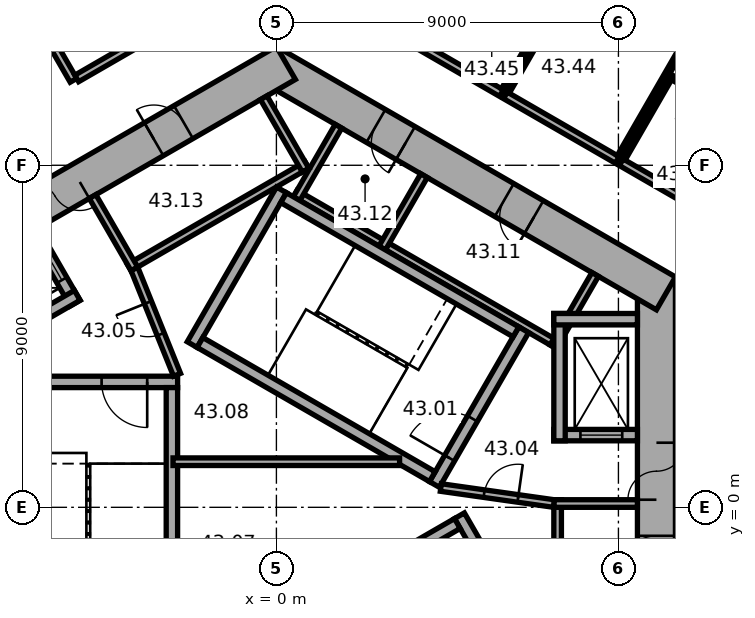
"""IFC4 building model, lengths in metres.
Left out: names, types, materials, properties, quantities, classifications, styles, units other than length and angle.
Written with IfcOpenShell. Run it as: python <this file> out.ifc"""

import sys

from ifc_helpers import new_model, si_unit, direction, frame, frame_2d, origin, place, context, subcontext, project, spatial, rectangle, extrude, element, fill, save


model = new_model("IFC4")
c1 = context("Model", 3, precision=1e-05, world=origin(), true_north=direction((0.0, 1.0)))
c2 = subcontext(c1, "Body", "Model", "MODEL_VIEW")
j1 = project(units=[si_unit("LENGTHUNIT", "METRE"), si_unit("PLANEANGLEUNIT", "RADIAN")], contexts=[c1])
p1 = place(None, origin())
s1 = spatial("IfcSite", under=j1, at=p1, CompositionType="ELEMENT")
p2 = place(p1, origin())
s2 = spatial("IfcBuilding", under=s1, at=p2, CompositionType="ELEMENT")
p3 = place(p2, frame((0.0, 0.0, 176.2)))
s3 = spatial("IfcBuildingStorey", under=s2, at=p3, CompositionType="ELEMENT", Elevation=176.2)
p4 = place(p3, frame((10.0, -6.062, 0.0), z_axis=(0.0, 0.0, 1.0), x_axis=(0.0, 1.0, 0.0)))
e1 = element("IfcWall", 1, at=p4, inside=s3, PredefinedType="SHEAR", context=c2, shape_type="SweptSolid", body=[
    extrude(rectangle(XDim=12.125, YDim=1.0, at=frame_2d((6.062, 0.0))), origin(), (0.0, 0.0, 1.0), 3.7),
])
p5 = place(p4, frame((6.262, 0.0, 0.0)))
e2 = element("IfcOpeningElement", 2, at=p5, cuts=e1, PredefinedType="OPENING", context=c2, shape_type="SweptSolid", body=[
    extrude(rectangle(XDim=1.5, YDim=2.1, at=frame_2d((0.75, 1.05))), frame((0.0, 0.51, 0.0), z_axis=(0.0, -1.0, 0.0), x_axis=(1.0, 0.0, 0.0)), (0.0, 0.0, 1.0), 1.02),
])
p6 = place(p4, frame((1.812, 0.0, 0.0)))
e3 = element("IfcOpeningElement", 3, at=p6, cuts=e1, PredefinedType="OPENING", context=c2, shape_type="SweptSolid", body=[
    extrude(rectangle(XDim=0.9, YDim=2.1, at=frame_2d((0.45, 1.05))), frame((0.0, 0.51, 0.0), z_axis=(0.0, -1.0, 0.0), x_axis=(1.0, 0.0, 0.0)), (0.0, 0.0, 1.0), 1.02),
])
p7 = place(p4, frame((4.412, 0.0, 0.0)))
e4 = element("IfcOpeningElement", 4, at=p7, cuts=e1, PredefinedType="OPENING", context=c2, shape_type="SweptSolid", body=[
    extrude(rectangle(XDim=0.9, YDim=2.1, at=frame_2d((0.45, 1.05))), frame((0.0, 0.51, 0.0), z_axis=(0.0, -1.0, 0.0), x_axis=(1.0, 0.0, 0.0)), (0.0, 0.0, 1.0), 1.02),
])
p8 = place(p3, frame((10.25, 5.629, 0.0), z_axis=(0.0, 0.0, 1.0), x_axis=(-0.866022616891, 0.50000482701, 0.0)))
e5 = element("IfcWall", 5, at=p8, inside=s3, PredefinedType="SHEAR", context=c2, shape_type="SweptSolid", body=[
    extrude(rectangle(XDim=12.125, YDim=1.0, at=frame_2d((6.062, 0.0))), origin(), (0.0, 0.0, 1.0), 3.7),
])
p9 = place(p8, frame((4.012, 0.0, 0.0)))
e6 = element("IfcOpeningElement", 6, at=p9, cuts=e5, PredefinedType="OPENING", context=c2, shape_type="SweptSolid", body=[
    extrude(rectangle(XDim=0.9, YDim=2.1, at=frame_2d((0.45, 1.05))), frame((0.0, 0.51, 0.0), z_axis=(0.0, -1.0, 0.0), x_axis=(1.0, 0.0, 0.0)), (0.0, 0.0, 1.0), 1.02),
])
p10 = place(p8, frame((7.912, 0.0, 0.0)))
e7 = element("IfcOpeningElement", 7, at=p10, cuts=e5, PredefinedType="OPENING", context=c2, shape_type="SweptSolid", body=[
    extrude(rectangle(XDim=0.9, YDim=2.1, at=frame_2d((0.45, 1.05))), frame((0.0, 0.51, 0.0), z_axis=(0.0, -1.0, 0.0), x_axis=(1.0, 0.0, 0.0)), (0.0, 0.0, 1.0), 1.02),
])
p11 = place(p3, frame((0.25, 11.691, 0.0), z_axis=(0.0, 0.0, 1.0), x_axis=(-0.866022616891, -0.50000482701, 0.0)))
e8 = element("IfcWall", 8, at=p11, inside=s3, PredefinedType="SHEAR", context=c2, shape_type="SweptSolid", body=[
    extrude(rectangle(XDim=12.125, YDim=1.0, at=frame_2d((6.062, 0.0))), origin(), (0.0, 0.0, 1.0), 3.7),
])
p12 = place(p11, frame((6.262, 0.0, 0.0)))
e9 = element("IfcOpeningElement", 9, at=p12, cuts=e8, PredefinedType="OPENING", context=c2, shape_type="SweptSolid", body=[
    extrude(rectangle(XDim=1.5, YDim=2.1, at=frame_2d((0.75, 1.05))), frame((0.0, 0.51, 0.0), z_axis=(0.0, -1.0, 0.0), x_axis=(1.0, 0.0, 0.0)), (0.0, 0.0, 1.0), 1.02),
])
p13 = place(p11, frame((3.112, 0.0, 0.0)))
e10 = element("IfcOpeningElement", 10, at=p13, cuts=e8, PredefinedType="OPENING", context=c2, shape_type="SweptSolid", body=[
    extrude(rectangle(XDim=0.9, YDim=2.1, at=frame_2d((0.45, 1.05))), frame((0.0, 0.51, 0.0), z_axis=(0.0, -1.0, 0.0), x_axis=(1.0, 0.0, 0.0)), (0.0, 0.0, 1.0), 1.02),
])
p14 = place(p3, frame((7.4, -5.2, 0.0), z_axis=(0.0, 0.0, 1.0), x_axis=(0.0, 1.0, 0.0)))
e11 = element("IfcWall", 11, at=p14, inside=s3, PredefinedType="PARTITIONING", context=c2, shape_type="SweptSolid", body=[
    extrude(rectangle(XDim=5.4, YDim=0.2, at=frame_2d((2.7, 0.0))), origin(), (0.0, 0.0, 1.0), 3.42),
])
p15 = place(p3, frame((7.3, 0.1, 0.0), z_axis=(0.0, 0.0, 1.0), x_axis=(1.0, 0.0, 0.0)))
e12 = element("IfcWall", 12, at=p15, inside=s3, PredefinedType="PARTITIONING", context=c2, shape_type="SweptSolid", body=[
    extrude(rectangle(XDim=2.2, YDim=0.2, at=frame_2d((1.1, 0.0))), origin(), (0.0, 0.0, 1.0), 3.42),
])
p16 = place(p3, frame((7.424, 4.259, 0.0), z_axis=(0.0, 0.0, 1.0), x_axis=(-0.866026010844, 0.49999894854, 0.0)))
e13 = element("IfcWall", 13, at=p16, inside=s3, PredefinedType="PARTITIONING", context=c2, shape_type="SweptSolid", body=[
    extrude(rectangle(XDim=8.0, YDim=0.2, at=frame_2d((4.0, 0.0))), origin(), (0.0, 0.0, 1.0), 3.42),
])
for number, where, z_axis, x_axis in (
    (14, (7.287, 4.222, 0.0), (0.0, 0.0, 1.0), (0.5, 0.866, 0.0)),
    (15, (2.784, 6.822, 0.0), (0.0, 0.0, 1.0), (0.5, 0.866, 0.0)),
    (16, (0.532, 8.122, 0.0), (0.0, 0.0, 1.0), (0.5, 0.866, 0.0)),
):
    element("IfcWall", number, at=place(p3, frame(where, z_axis=z_axis, x_axis=x_axis)), inside=s3, PredefinedType="PARTITIONING", context=c2, shape_type="SweptSolid", body=[
        extrude(rectangle(XDim=2.2, YDim=0.2, at=frame_2d((1.1, 0.0))), origin(), (0.0, 0.0, 1.0), 3.42),
    ])
p17 = place(p3, frame((0.803, 9.009, 0.0), z_axis=(0.0, 0.0, 1.0), x_axis=(-0.866028230842, -0.499995103361, 0.0)))
e17 = element("IfcWall", 17, at=p17, inside=s3, PredefinedType="PARTITIONING", context=c2, shape_type="SweptSolid", body=[
    extrude(rectangle(XDim=5.4, YDim=0.2, at=frame_2d((2.7, 0.0))), origin(), (0.0, 0.0, 1.0), 3.42),
])
p18 = place(p3, frame((0.767, 8.872, 0.0), z_axis=(0.0, 0.0, 1.0), x_axis=(-0.499994660107, 0.866028486751, 0.0)))
e18 = element("IfcWall", 18, at=p18, inside=s3, PredefinedType="PARTITIONING", context=c2, shape_type="SweptSolid", body=[
    extrude(rectangle(XDim=2.2, YDim=0.2, at=frame_2d((1.1, 0.0))), origin(), (0.0, 0.0, 1.0), 3.42),
])
p19 = place(p3, frame((-3.737, 6.272, 0.0), z_axis=(0.0, 0.0, 1.0), x_axis=(-0.50002983664, 0.866008176907, 0.0)))
e19 = element("IfcWall", 19, at=p19, inside=s3, PredefinedType="PARTITIONING", context=c2, shape_type="SweptSolid", body=[
    extrude(rectangle(XDim=2.2, YDim=0.2, at=frame_2d((1.1, 0.0))), origin(), (0.0, 0.0, 1.0), 3.42),
])
p20 = place(p3, frame((4.158, 0.602, 0.0), z_axis=(0.0, 0.0, 1.0), x_axis=(0.499977259774, 0.866038532462, 0.0)))
e20 = element("IfcWall", 20, at=p20, inside=s3, PredefinedType="SHEAR", context=c2, shape_type="SweptSolid", body=[
    extrude(rectangle(XDim=4.7, YDim=0.3, at=frame_2d((2.35, 0.0))), origin(), (0.0, 0.0, 1.0), 3.42),
])
p21 = place(p20, frame((0.8, 0.0, 0.0)))
e21 = element("IfcOpeningElement", 21, at=p21, cuts=e20, PredefinedType="OPENING", context=c2, shape_type="SweptSolid", body=[
    extrude(rectangle(XDim=1.2, YDim=2.1, at=frame_2d((0.6, 1.05))), frame((0.0, 0.16, 0.0), z_axis=(0.0, -1.0, 0.0), x_axis=(1.0, 0.0, 0.0)), (0.0, 0.0, 1.0), 0.32),
])
p22 = place(p3, frame((-2.216, 4.282, 0.0), z_axis=(0.0, 0.0, 1.0), x_axis=(0.499977259774, 0.866038532462, 0.0)))
e22 = element("IfcWall", 22, at=p22, inside=s3, PredefinedType="SHEAR", context=c2, shape_type="SweptSolid", body=[
    extrude(rectangle(XDim=4.7, YDim=0.3, at=frame_2d((2.35, 0.0))), origin(), (0.0, 0.0, 1.0), 3.42),
])
for number, where, z_axis, x_axis in (
    (23, (4.103, 0.807, 0.0), (0.0, 0.0, 1.0), (-0.866, 0.5, 0.0)),
    (24, (6.303, 4.617, 0.0), (0.0, 0.0, 1.0), (-0.866, 0.5, 0.0)),
):
    element("IfcWall", number, at=place(p3, frame(where, z_axis=z_axis, x_axis=x_axis)), inside=s3, PredefinedType="SHEAR", context=c2, shape_type="SweptSolid", body=[
        extrude(rectangle(XDim=7.06, YDim=0.3, at=frame_2d((3.53, 0.0))), origin(), (0.0, 0.0, 1.0), 3.42),
    ])
p23 = place(p3, frame((-2.6, 3.3, 0.0), z_axis=(0.0, 0.0, 1.0), x_axis=(-1.0, 0.0, 0.0)))
e25 = element("IfcWall", 25, at=p23, inside=s3, PredefinedType="SHEAR", context=c2, shape_type="SweptSolid", body=[
    extrude(rectangle(XDim=4.7, YDim=0.3, at=frame_2d((2.35, 0.0))), origin(), (0.0, 0.0, 1.0), 3.42),
])
p24 = place(p23, frame((0.8, 0.0, 0.0)))
e26 = element("IfcOpeningElement", 26, at=p24, cuts=e25, PredefinedType="OPENING", context=c2, shape_type="SweptSolid", body=[
    extrude(rectangle(XDim=1.2, YDim=2.1, at=frame_2d((0.6, 1.05))), frame((0.0, 0.16, 0.0), z_axis=(0.0, -1.0, 0.0), x_axis=(1.0, 0.0, 0.0)), (0.0, 0.0, 1.0), 0.32),
])
p25 = place(p3, frame((-2.75, 3.15, 0.0), z_axis=(0.0, 0.0, 1.0), x_axis=(0.0, -1.0, 0.0)))
e27 = element("IfcWall", 27, at=p25, inside=s3, PredefinedType="SHEAR", context=c2, shape_type="SweptSolid", body=[
    extrude(rectangle(XDim=7.06, YDim=0.3, at=frame_2d((3.53, 0.0))), origin(), (0.0, 0.0, 1.0), 3.42),
])
p26 = place(p3, frame((4.816, -0.222, 0.0), z_axis=(0.0, 0.0, 1.0), x_axis=(0.499977259774, -0.866038532462, 0.0)))
e28 = element("IfcWall", 28, at=p26, inside=s3, PredefinedType="SHEAR", context=c2, shape_type="SweptSolid", body=[
    extrude(rectangle(XDim=4.7, YDim=0.3, at=frame_2d((2.35, 0.0))), origin(), (0.0, 0.0, 1.0), 3.42),
])
p27 = place(p3, frame((-1.353, -3.957, 0.0), z_axis=(0.0, 0.0, 1.0), x_axis=(0.866027801685, 0.499995846692, 0.0)))
e29 = element("IfcWall", 29, at=p27, inside=s3, PredefinedType="SHEAR", context=c2, shape_type="SweptSolid", body=[
    extrude(rectangle(XDim=7.06, YDim=0.3, at=frame_2d((3.53, 0.0))), origin(), (0.0, 0.0, 1.0), 3.42),
])
p28 = place(p3, frame((7.3, 1.9, 0.0), z_axis=(0.0, 0.0, 1.0), x_axis=(1.0, 0.0, 0.0)))
e30 = element("IfcWall", 30, at=p28, inside=s3, PredefinedType="SHEAR", context=c2, shape_type="SweptSolid", body=[
    extrude(rectangle(XDim=2.2, YDim=0.3, at=frame_2d((1.1, 0.0))), origin(), (0.0, 0.0, 1.0), 3.42),
])
p29 = place(p28, frame((0.7, 0.0, 0.0)))
e31 = element("IfcOpeningElement", 31, at=p29, cuts=e30, PredefinedType="OPENING", context=c2, shape_type="SweptSolid", body=[
    extrude(rectangle(XDim=1.1, YDim=2.1, at=frame_2d((0.55, 1.05))), frame((0.0, 0.16, 0.0), z_axis=(0.0, -1.0, 0.0), x_axis=(1.0, 0.0, 0.0)), (0.0, 0.0, 1.0), 0.32),
])
p30 = place(p3, frame((7.45, 1.75, 0.0), z_axis=(0.0, 0.0, 1.0), x_axis=(0.0, 1.0, 0.0)))
e32 = element("IfcWall", 32, at=p30, inside=s3, PredefinedType="SHEAR", context=c2, shape_type="SweptSolid", body=[
    extrude(rectangle(XDim=3.35, YDim=0.3, at=frame_2d((1.675, 0.0))), origin(), (0.0, 0.0, 1.0), 3.42),
])
p31 = place(p3, frame((7.3, 4.95, 0.0), z_axis=(0.0, 0.0, 1.0), x_axis=(1.0, 0.0, 0.0)))
e33 = element("IfcWall", 33, at=p31, inside=s3, PredefinedType="SHEAR", context=c2, shape_type="SweptSolid", body=[
    extrude(rectangle(XDim=2.2, YDim=0.3, at=frame_2d((1.1, 0.0))), origin(), (0.0, 0.0, 1.0), 3.42),
])
p32 = place(p3, frame((4.327, 0.521, 0.0), z_axis=(0.0, 0.0, 1.0), x_axis=(0.990124376366, -0.14019172346, 0.0)))
e34 = element("IfcWall", 34, at=p32, inside=s3, PredefinedType="PARTITIONING", context=c2, shape_type="SweptSolid", body=[
    extrude(rectangle(XDim=3.002, YDim=0.2, at=frame_2d((1.501, 0.0))), origin(), (0.0, 0.0, 1.0), 3.42),
])
p33 = place(p32, frame((1.15, 0.0, 0.0)))
e35 = element("IfcOpeningElement", 35, at=p33, cuts=e34, PredefinedType="OPENING", context=c2, shape_type="SweptSolid", body=[
    extrude(rectangle(XDim=0.9, YDim=2.1, at=frame_2d((0.45, 1.05))), frame((0.0, 0.11, 0.0), z_axis=(0.0, -1.0, 0.0), x_axis=(1.0, 0.0, 0.0)), (0.0, 0.0, 1.0), 0.22),
])
p34 = place(p3, frame((-5.295, 5.372, 0.0), z_axis=(0.0, 0.0, 1.0), x_axis=(-0.500077893725, 0.86598042715, 0.0)))
e36 = element("IfcWall", 36, at=p34, inside=s3, PredefinedType="SHEAR", context=c2, shape_type="SweptSolid", body=[
    extrude(rectangle(XDim=2.2, YDim=0.3, at=frame_2d((1.1, 0.0))), origin(), (0.0, 0.0, 1.0), 3.42),
])
p35 = place(p34, frame((0.7, 0.0, 0.0)))
e37 = element("IfcOpeningElement", 37, at=p35, cuts=e36, PredefinedType="OPENING", context=c2, shape_type="SweptSolid", body=[
    extrude(rectangle(XDim=1.1, YDim=2.1, at=frame_2d((0.55, 1.05))), frame((0.0, 0.16, 0.0), z_axis=(0.0, -1.0, 0.0), x_axis=(1.0, 0.0, 0.0)), (0.0, 0.0, 1.0), 0.32),
])
p36 = place(p3, frame((-5.24, 5.577, 0.0), z_axis=(0.0, 0.0, 1.0), x_axis=(-0.866014461049, -0.500018952895, 0.0)))
e38 = element("IfcWall", 38, at=p36, inside=s3, PredefinedType="SHEAR", context=c2, shape_type="SweptSolid", body=[
    extrude(rectangle(XDim=3.35, YDim=0.3, at=frame_2d((1.675, 0.0))), origin(), (0.0, 0.0, 1.0), 3.42),
])
p37 = place(p3, frame((-2.615, 3.487, 0.0), z_axis=(0.0, 0.0, 1.0), x_axis=(-0.373576831041, 0.92759924068, 0.0)))
e39 = element("IfcWall", 39, at=p37, inside=s3, PredefinedType="PARTITIONING", context=c2, shape_type="SweptSolid", body=[
    extrude(rectangle(XDim=3.002, YDim=0.2, at=frame_2d((1.501, 0.0))), origin(), (0.0, 0.0, 1.0), 3.42),
])
p38 = place(p37, frame((1.15, 0.0, 0.0)))
e40 = element("IfcOpeningElement", 40, at=p38, cuts=e39, PredefinedType="OPENING", context=c2, shape_type="SweptSolid", body=[
    extrude(rectangle(XDim=0.9, YDim=2.1, at=frame_2d((0.45, 1.05))), frame((0.0, 0.11, 0.0), z_axis=(0.0, -1.0, 0.0), x_axis=(1.0, 0.0, 0.0)), (0.0, 0.0, 1.0), 0.22),
])
p39 = place(p3, frame((-2.72, 1.2, 0.0), z_axis=(0.0, 0.0, 1.0), x_axis=(1.0, 0.0, 0.0)))
e41 = element("IfcWall", 41, at=p39, inside=s3, PredefinedType="PARTITIONING", context=c2, shape_type="SweptSolid", body=[
    extrude(rectangle(XDim=5.961, YDim=0.2, at=frame_2d((2.981, 0.0))), origin(), (0.0, 0.0, 1.0), 3.42),
])
p40 = place(p3, frame((-9.515, 18.466, 0.0), z_axis=(0.0, 0.0, 1.0), x_axis=(0.500010139422, -0.866019549707, 0.0)))
e42 = element("IfcWall", 42, at=p40, inside=s3, PredefinedType="PARTITIONING", context=c2, shape_type="SweptSolid", body=[
    extrude(rectangle(XDim=8.35, YDim=0.2, at=frame_2d((4.175, 0.0))), origin(), (0.0, 0.0, 1.0), 2.87),
])
p41 = place(p40, frame((3.675, 0.0, 0.0)))
e43 = element("IfcOpeningElement", 43, at=p41, cuts=e42, PredefinedType="OPENING", context=c2, shape_type="SweptSolid", body=[
    extrude(rectangle(XDim=1.0, YDim=2.1, at=frame_2d((0.5, 1.05))), frame((0.0, 0.11, 0.0), z_axis=(0.0, -1.0, 0.0), x_axis=(1.0, 0.0, 0.0)), (0.0, 0.0, 1.0), 0.22),
])
p42 = place(p3, frame((-0.95, 13.77, 0.0), z_axis=(0.0, 0.0, 1.0), x_axis=(-0.866036689987, -0.499980451214, 0.0)))
e44 = element("IfcWall", 44, at=p42, inside=s3, PredefinedType="PARTITIONING", context=c2, shape_type="SweptSolid", body=[
    extrude(rectangle(XDim=4.969, YDim=0.2, at=frame_2d((2.485, 0.0))), origin(), (0.0, 0.0, 1.0), 3.42),
])
p43 = place(p3, frame((4.24, 11.986, 0.0), z_axis=(0.0, 0.0, 1.0), x_axis=(0.499952165731, 0.866053019151, 0.0)))
e45 = element("IfcWall", 45, at=p43, inside=s3, PredefinedType="PARTITIONING", context=c2, shape_type="SweptSolid", body=[
    extrude(rectangle(XDim=2.3, YDim=0.12, at=frame_2d((1.15, 0.0))), origin(), (0.0, 0.0, 1.0), 3.42),
])
p44 = place(p43, frame((0.7, 0.0, 0.0)))
e46 = element("IfcOpeningElement", 46, at=p44, cuts=e45, PredefinedType="OPENING", context=c2, shape_type="SweptSolid", body=[
    extrude(rectangle(XDim=0.9, YDim=2.1, at=frame_2d((0.45, 1.05))), frame((0.0, 0.07, 0.0), z_axis=(0.0, -1.0, 0.0), x_axis=(1.0, 0.0, 0.0)), (0.0, 0.0, 1.0), 0.14),
])
p45 = place(p3, frame((5.922, 10.899, 0.0), z_axis=(0.0, 0.0, 1.0), x_axis=(-0.866031556924, 0.499989342298, 0.0)))
e47 = element("IfcWall", 47, at=p45, inside=s3, PredefinedType="PARTITIONING", context=c2, shape_type="SweptSolid", body=[
    extrude(rectangle(XDim=5.701, YDim=0.2, at=frame_2d((2.851, 0.0))), origin(), (0.0, 0.0, 1.0), 3.42),
])
p46 = place(p3, frame((6.076, 10.926, 0.0), z_axis=(0.0, 0.0, 1.0), x_axis=(0.500010275428, 0.866019471182, 0.0)))
e48 = element("IfcWall", 48, at=p46, inside=s3, PredefinedType="PARTITIONING", context=c2, shape_type="SweptSolid", body=[
    extrude(rectangle(XDim=3.5, YDim=0.12, at=frame_2d((1.75, 0.0))), origin(), (0.0, 0.0, 1.0), 3.42),
])
p47 = place(p3, frame((7.092, 12.926, 0.0), z_axis=(0.0, 0.0, 1.0), x_axis=(-0.500030632641, -0.866007717299, 0.0)))
e49 = element("IfcWall", 49, at=p47, inside=s3, PredefinedType="PARTITIONING", context=c2, shape_type="SweptSolid", body=[
    extrude(rectangle(XDim=2.24, YDim=0.12, at=frame_2d((1.12, 0.0))), origin(), (0.0, 0.0, 1.0), 3.42),
])
p48 = place(p3, frame((8.971, 9.139, 0.0), z_axis=(0.0, 0.0, 1.0), x_axis=(-0.866038511948, 0.499977295307, 0.0)))
e50 = element("IfcWall", 50, at=p48, inside=s3, PredefinedType="PARTITIONING", context=c2, shape_type="SweptSolid", body=[
    extrude(rectangle(XDim=3.4, YDim=0.2, at=frame_2d((1.7, 0.0))), origin(), (0.0, 0.0, 1.0), 3.42),
])
p49 = place(p3, frame((9.125, 9.166, 0.0), z_axis=(0.0, 0.0, 1.0), x_axis=(0.500004234368, 0.866022959057, 0.0)))
e51 = element("IfcWall", 51, at=p49, inside=s3, PredefinedType="PARTITIONING", context=c2, shape_type="SweptSolid", body=[
    extrude(rectangle(XDim=2.5, YDim=0.12, at=frame_2d((1.25, 0.0))), origin(), (0.0, 0.0, 1.0), 3.42),
])
p50 = place(p3, frame((10.427, 11.301, 0.0), z_axis=(0.0, 0.0, 1.0), x_axis=(0.866019511163, -0.500010206181, 0.0)))
e52 = element("IfcWall", 52, at=p50, inside=s3, PredefinedType="PARTITIONING", context=c2, shape_type="SweptSolid", body=[
    extrude(rectangle(XDim=2.13, YDim=0.12, at=frame_2d((1.065, 0.0))), origin(), (0.0, 0.0, 1.0), 3.42),
])
p51 = place(p50, frame((0.615, 0.0, 0.0)))
e53 = element("IfcOpeningElement", 53, at=p51, cuts=e52, PredefinedType="OPENING", context=c2, shape_type="SweptSolid", body=[
    extrude(rectangle(XDim=0.9, YDim=2.1, at=frame_2d((0.45, 1.05))), frame((0.0, 0.07, 0.0), z_axis=(0.0, -1.0, 0.0), x_axis=(1.0, 0.0, 0.0)), (0.0, 0.0, 1.0), 0.14),
])
p52 = place(p3, frame((10.74, 12.205, 0.0), z_axis=(0.0, 0.0, 1.0), x_axis=(-0.499978425106, -0.866037859697, 0.0)))
e54 = element("IfcWall", 54, at=p52, inside=s3, PredefinedType="PARTITIONING", context=c2, shape_type="SweptSolid", body=[
    extrude(rectangle(XDim=3.44, YDim=0.12, at=frame_2d((1.72, 0.0))), origin(), (0.0, 0.0, 1.0), 3.42),
])
p53 = place(p3, frame((10.98, 7.979, 0.0), z_axis=(0.0, 0.0, 1.0), x_axis=(-0.866008176907, 0.50002983664, 0.0)))
e55 = element("IfcWall", 55, at=p53, inside=s3, PredefinedType="PARTITIONING", context=c2, shape_type="SweptSolid", body=[
    extrude(rectangle(XDim=2.2, YDim=0.2, at=frame_2d((1.1, 0.0))), origin(), (0.0, 0.0, 1.0), 3.42),
])
p54 = place(p5, origin())
e56 = element("IfcDoor", 56, at=p54, inside=s3, OperationType="DOUBLE_DOOR_SINGLE_SWING", PredefinedType="DOOR", context=c2, shape_type="SweptSolid", body=[
    extrude(rectangle(XDim=1.5, YDim=2.1, at=frame_2d((0.75, 1.05))), frame((0.0, 0.025, 0.0), z_axis=(0.0, -1.0, 0.0), x_axis=(1.0, 0.0, 0.0)), (0.0, 0.0, 1.0), 0.05),
])
fill(e2, e56)
p55 = place(p12, origin())
e57 = element("IfcDoor", 57, at=p55, inside=s3, OperationType="DOUBLE_DOOR_SINGLE_SWING", PredefinedType="DOOR", context=c2, shape_type="SweptSolid", body=[
    extrude(rectangle(XDim=1.5, YDim=2.1, at=frame_2d((0.75, 1.05))), frame((0.0, 0.025, 0.0), z_axis=(0.0, -1.0, 0.0), x_axis=(1.0, 0.0, 0.0)), (0.0, 0.0, 1.0), 0.05),
])
fill(e9, e57)
p56 = place(p21, origin())
e58 = element("IfcDoor", 58, at=p56, inside=s3, OperationType="SINGLE_SWING_RIGHT", PredefinedType="DOOR", context=c2, shape_type="SweptSolid", body=[
    extrude(rectangle(XDim=1.2, YDim=2.1, at=frame_2d((0.6, 1.05))), frame((0.0, 0.025, 0.0), z_axis=(0.0, -1.0, 0.0), x_axis=(1.0, 0.0, 0.0)), (0.0, 0.0, 1.0), 0.05),
])
fill(e21, e58)
p57 = place(p24, origin())
e59 = element("IfcDoor", 59, at=p57, inside=s3, OperationType="SINGLE_SWING_RIGHT", PredefinedType="DOOR", context=c2, shape_type="SweptSolid", body=[
    extrude(rectangle(XDim=1.2, YDim=2.1, at=frame_2d((0.6, 1.05))), frame((0.0, 0.025, 0.0), z_axis=(0.0, -1.0, 0.0), x_axis=(1.0, 0.0, 0.0)), (0.0, 0.0, 1.0), 0.05),
])
fill(e26, e59)
p58 = place(p33, origin())
e60 = element("IfcDoor", 60, at=p58, inside=s3, OperationType="SINGLE_SWING_LEFT", PredefinedType="DOOR", context=c2, shape_type="SweptSolid", body=[
    extrude(rectangle(XDim=0.9, YDim=2.1, at=frame_2d((0.45, 1.05))), frame((0.0, 0.025, 0.0), z_axis=(0.0, -1.0, 0.0), x_axis=(1.0, 0.0, 0.0)), (0.0, 0.0, 1.0), 0.05),
])
fill(e35, e60)
p59 = place(p38, origin())
e61 = element("IfcDoor", 61, at=p59, inside=s3, OperationType="SINGLE_SWING_LEFT", PredefinedType="DOOR", context=c2, shape_type="SweptSolid", body=[
    extrude(rectangle(XDim=0.9, YDim=2.1, at=frame_2d((0.45, 1.05))), frame((0.0, 0.025, 0.0), z_axis=(0.0, -1.0, 0.0), x_axis=(1.0, 0.0, 0.0)), (0.0, 0.0, 1.0), 0.05),
])
fill(e40, e61)
p60 = place(p7, origin())
e62 = element("IfcDoor", 62, at=p60, inside=s3, OperationType="SINGLE_SWING_LEFT", PredefinedType="DOOR", context=c2, shape_type="SweptSolid", body=[
    extrude(rectangle(XDim=0.9, YDim=2.1, at=frame_2d((0.45, 1.05))), frame((0.0, 0.025, 0.0), z_axis=(0.0, -1.0, 0.0), x_axis=(1.0, 0.0, 0.0)), (0.0, 0.0, 1.0), 0.05),
])
fill(e4, e62)
p61 = place(p9, origin())
e63 = element("IfcDoor", 63, at=p61, inside=s3, OperationType="SINGLE_SWING_LEFT", PredefinedType="DOOR", context=c2, shape_type="SweptSolid", body=[
    extrude(rectangle(XDim=0.9, YDim=2.1, at=frame_2d((0.45, 1.05))), frame((0.0, 0.025, 0.0), z_axis=(0.0, -1.0, 0.0), x_axis=(1.0, 0.0, 0.0)), (0.0, 0.0, 1.0), 0.05),
])
fill(e6, e63)
p62 = place(p10, origin())
e64 = element("IfcDoor", 64, at=p62, inside=s3, OperationType="SINGLE_SWING_LEFT", PredefinedType="DOOR", context=c2, shape_type="SweptSolid", body=[
    extrude(rectangle(XDim=0.9, YDim=2.1, at=frame_2d((0.45, 1.05))), frame((0.0, 0.025, 0.0), z_axis=(0.0, -1.0, 0.0), x_axis=(1.0, 0.0, 0.0)), (0.0, 0.0, 1.0), 0.05),
])
fill(e7, e64)
p63 = place(p13, origin())
e65 = element("IfcDoor", 65, at=p63, inside=s3, OperationType="SINGLE_SWING_LEFT", PredefinedType="DOOR", context=c2, shape_type="SweptSolid", body=[
    extrude(rectangle(XDim=0.9, YDim=2.1, at=frame_2d((0.45, 1.05))), frame((0.0, 0.025, 0.0), z_axis=(0.0, -1.0, 0.0), x_axis=(1.0, 0.0, 0.0)), (0.0, 0.0, 1.0), 0.05),
])
fill(e10, e65)
p64 = place(p29, origin())
e66 = element("IfcDoor", 66, at=p64, inside=s3, OperationType="DOUBLE_DOOR_SLIDING", PredefinedType="DOOR", context=c2, shape_type="SweptSolid", body=[
    extrude(rectangle(XDim=1.1, YDim=2.1, at=frame_2d((0.55, 1.05))), frame((0.0, 0.025, 0.0), z_axis=(0.0, -1.0, 0.0), x_axis=(1.0, 0.0, 0.0)), (0.0, 0.0, 1.0), 0.05),
])
fill(e31, e66)
p65 = place(p35, origin())
e67 = element("IfcDoor", 67, at=p65, inside=s3, OperationType="DOUBLE_DOOR_SLIDING", PredefinedType="DOOR", context=c2, shape_type="SweptSolid", body=[
    extrude(rectangle(XDim=1.1, YDim=2.1, at=frame_2d((0.55, 1.05))), frame((0.0, 0.025, 0.0), z_axis=(0.0, -1.0, 0.0), x_axis=(1.0, 0.0, 0.0)), (0.0, 0.0, 1.0), 0.05),
])
fill(e37, e67)
save(model, sys.argv[1])
